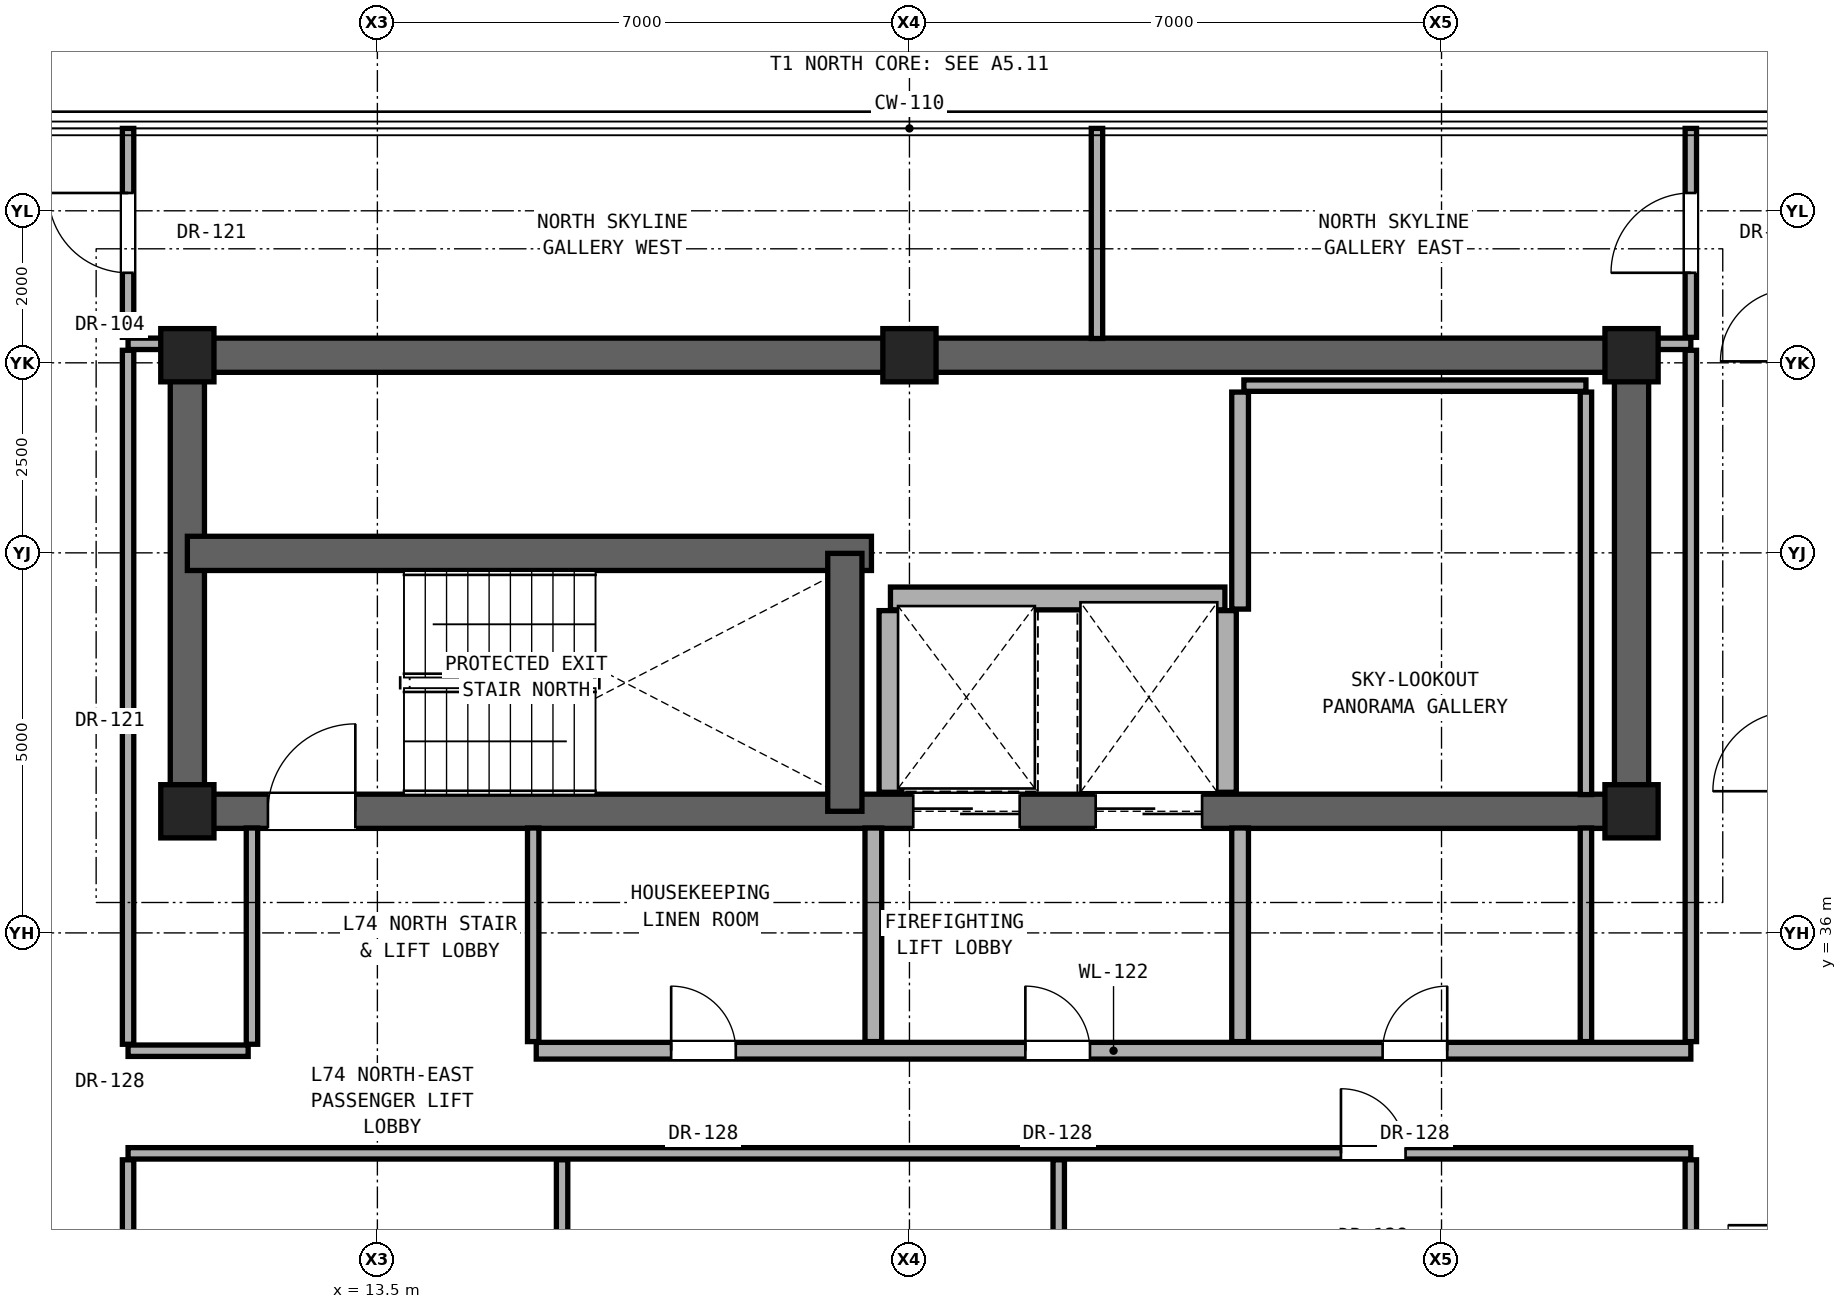
"""IFC4 building model, lengths in metres.
Left out: names, types, materials, properties, quantities, classifications, styles, units other than length and angle.
Written with IfcOpenShell. Run it as: python <this file> out.ifc"""

import sys

from ifc_helpers import new_model, si_unit, direction, frame, frame_2d, origin, origin_2d, place, context, subcontext, project, spatial, rectangle, extrude, element, fill, save


model = new_model("IFC4")
c1 = context("Model", 3, precision=1e-05, world=origin(), true_north=direction((0.0, 1.0)))
c2 = subcontext(c1, "Body", "Model", "MODEL_VIEW")
j1 = project(units=[si_unit("LENGTHUNIT", "METRE"), si_unit("PLANEANGLEUNIT", "RADIAN")], contexts=[c1])
p1 = place(None, origin())
s1 = spatial("IfcSite", under=j1, at=p1, CompositionType="ELEMENT")
p2 = place(p1, origin())
s2 = spatial("IfcBuilding", under=s1, at=p2, CompositionType="ELEMENT")
p3 = place(p2, frame((0.0, 0.0, 259.9)))
s3 = spatial("IfcBuildingStorey", under=s2, at=p3, CompositionType="ELEMENT", Elevation=259.9)
for number, where, z_axis, x_axis in (
    (1, (11.0, 37.6, 0.0), (0.0, 0.0, 1.0), (1.0, 0.0, 0.0)),
    (2, (30.0, 37.6, 0.0), (0.0, 0.0, 1.0), (1.0, 0.0, 0.0)),
    (3, (11.0, 43.6, 0.0), (0.0, 0.0, 1.0), (1.0, 0.0, 0.0)),
    (4, (20.5, 43.6, 0.0), (0.0, 0.0, 1.0), (1.0, 0.0, 0.0)),
    (5, (30.0, 43.6, 0.0), (0.0, 0.0, 1.0), (1.0, 0.0, 0.0)),
):
    element("IfcColumn", number, at=place(p3, frame(where, z_axis=z_axis, x_axis=x_axis)), inside=s3, PredefinedType="COLUMN", context=c2, shape_type="SweptSolid", body=[
        extrude(rectangle(XDim=0.7, YDim=0.7, at=origin_2d()), origin(), (0.0, 0.0, 1.0), 3.6),
    ])
p4 = place(p3, frame((11.0, 43.6, 0.0), z_axis=(0.0, 0.0, 1.0), x_axis=(1.0, 0.0, 0.0)))
e6 = element("IfcWall", 6, at=p4, inside=s3, PredefinedType="SHEAR", context=c2, shape_type="SweptSolid", body=[
    extrude(rectangle(XDim=19.0, YDim=0.45, at=frame_2d((9.5, 0.0))), origin(), (0.0, 0.0, 1.0), 2.95),
])
for number, where, z_axis, x_axis in (
    (7, (11.0, 37.6, 0.0), (0.0, 0.0, 1.0), (0.0, 1.0, 0.0)),
    (8, (30.0, 37.6, 0.0), (0.0, 0.0, 1.0), (0.0, 1.0, 0.0)),
):
    element("IfcWall", number, at=place(p3, frame(where, z_axis=z_axis, x_axis=x_axis)), inside=s3, PredefinedType="SHEAR", context=c2, shape_type="SweptSolid", body=[
        extrude(rectangle(XDim=6.0, YDim=0.45, at=frame_2d((3.0, 0.0))), origin(), (0.0, 0.0, 1.0), 2.95),
    ])
p5 = place(p3, frame((11.0, 37.6, 0.0), z_axis=(0.0, 0.0, 1.0), x_axis=(1.0, 0.0, 0.0)))
e9 = element("IfcWall", 9, at=p5, inside=s3, PredefinedType="SHEAR", context=c2, shape_type="SweptSolid", body=[
    extrude(rectangle(XDim=19.0, YDim=0.45, at=frame_2d((9.5, 0.0))), origin(), (0.0, 0.0, 1.0), 2.95),
])
p6 = place(p5, frame((1.06, 0.0, 0.0)))
e10 = element("IfcOpeningElement", 10, at=p6, cuts=e9, PredefinedType="OPENING", context=c2, shape_type="SweptSolid", body=[
    extrude(rectangle(XDim=1.15, YDim=2.2, at=frame_2d((0.575, 1.1))), frame((0.0, 0.235, 0.0), z_axis=(0.0, -1.0, 0.0), x_axis=(1.0, 0.0, 0.0)), (0.0, 0.0, 1.0), 0.47),
])
p7 = place(p5, frame((9.55, 0.0, 0.0)))
e11 = element("IfcOpeningElement", 11, at=p7, cuts=e9, PredefinedType="OPENING", context=c2, shape_type="SweptSolid", body=[
    extrude(rectangle(XDim=1.4, YDim=2.35, at=frame_2d((0.7, 1.175))), frame((0.0, 0.235, 0.0), z_axis=(0.0, -1.0, 0.0), x_axis=(1.0, 0.0, 0.0)), (0.0, 0.0, 1.0), 0.47),
])
p8 = place(p5, frame((11.95, 0.0, 0.0)))
e12 = element("IfcOpeningElement", 12, at=p8, cuts=e9, PredefinedType="OPENING", context=c2, shape_type="SweptSolid", body=[
    extrude(rectangle(XDim=1.4, YDim=2.35, at=frame_2d((0.7, 1.175))), frame((0.0, 0.235, 0.0), z_axis=(0.0, -1.0, 0.0), x_axis=(1.0, 0.0, 0.0)), (0.0, 0.0, 1.0), 0.47),
])
p9 = place(p3, frame((11.0, 40.993, 0.0), z_axis=(0.0, 0.0, 1.0), x_axis=(1.0, 0.0, 0.0)))
e13 = element("IfcWall", 13, at=p9, inside=s3, PredefinedType="SHEAR", context=c2, shape_type="SweptSolid", body=[
    extrude(rectangle(XDim=9.0, YDim=0.45, at=frame_2d((4.5, 0.0))), origin(), (0.0, 0.0, 1.0), 2.95),
])
p10 = place(p3, frame((19.65, 37.6, 0.0), z_axis=(0.0, 0.0, 1.0), x_axis=(0.0, 1.0, 0.0)))
e14 = element("IfcWall", 14, at=p10, inside=s3, PredefinedType="SHEAR", context=c2, shape_type="SweptSolid", body=[
    extrude(rectangle(XDim=3.393, YDim=0.45, at=frame_2d((1.696, 0.0))), origin(), (0.0, 0.0, 1.0), 2.95),
])
p11 = place(p3, frame((10.22, 33.1, 0.0), z_axis=(0.0, 0.0, 1.0), x_axis=(1.0, 0.0, 0.0)))
e15 = element("IfcWall", 15, at=p11, inside=s3, PredefinedType="PARTITIONING", context=c2, shape_type="SweptSolid", body=[
    extrude(rectangle(XDim=20.56, YDim=0.15, at=frame_2d((10.28, 0.0))), origin(), (0.0, 0.0, 1.0), 2.086),
])
p12 = place(p11, frame((15.957, 0.0, 0.0)))
e16 = element("IfcOpeningElement", 16, at=p12, cuts=e15, PredefinedType="OPENING", context=c2, shape_type="SweptSolid", body=[
    extrude(rectangle(XDim=0.85, YDim=2.01, at=frame_2d((0.425, 1.005))), frame((0.0, 0.085, 0.0), z_axis=(0.0, -1.0, 0.0), x_axis=(1.0, 0.0, 0.0)), (0.0, 0.0, 1.0), 0.17),
])
p13 = place(p3, frame((10.22, 34.45, 0.0), z_axis=(0.0, 0.0, 1.0), x_axis=(1.0, 0.0, 0.0)))
e17 = element("IfcWall", 17, at=p13, inside=s3, PredefinedType="PARTITIONING", context=c2, shape_type="SweptSolid", body=[
    extrude(rectangle(XDim=1.58, YDim=0.15, at=frame_2d((0.79, 0.0))), origin(), (0.0, 0.0, 1.0), 2.086),
])
p14 = place(p3, frame((15.59, 34.45, 0.0), z_axis=(0.0, 0.0, 1.0), x_axis=(1.0, 0.0, 0.0)))
e18 = element("IfcWall", 18, at=p14, inside=s3, PredefinedType="SOLIDWALL", context=c2, shape_type="SweptSolid", body=[
    extrude(rectangle(XDim=15.19, YDim=0.22, at=frame_2d((7.595, 0.0))), origin(), (0.0, 0.0, 1.0), 2.086),
])
p15 = place(p14, frame((6.435, 0.0, 0.0)))
e19 = element("IfcOpeningElement", 19, at=p15, cuts=e18, PredefinedType="OPENING", context=c2, shape_type="SweptSolid", body=[
    extrude(rectangle(XDim=0.85, YDim=2.01, at=frame_2d((0.425, 1.005))), frame((0.0, 0.12, 0.0), z_axis=(0.0, -1.0, 0.0), x_axis=(1.0, 0.0, 0.0)), (0.0, 0.0, 1.0), 0.24),
])
p16 = place(p14, frame((11.135, 0.0, 0.0)))
e20 = element("IfcOpeningElement", 20, at=p16, cuts=e18, PredefinedType="OPENING", context=c2, shape_type="SweptSolid", body=[
    extrude(rectangle(XDim=0.85, YDim=2.01, at=frame_2d((0.425, 1.005))), frame((0.0, 0.12, 0.0), z_axis=(0.0, -1.0, 0.0), x_axis=(1.0, 0.0, 0.0)), (0.0, 0.0, 1.0), 0.24),
])
p17 = place(p14, frame((1.775, 0.0, 0.0)))
e21 = element("IfcOpeningElement", 21, at=p17, cuts=e18, PredefinedType="OPENING", context=c2, shape_type="SweptSolid", body=[
    extrude(rectangle(XDim=0.85, YDim=2.01, at=frame_2d((0.425, 1.005))), frame((0.0, 0.12, 0.0), z_axis=(0.0, -1.0, 0.0), x_axis=(1.0, 0.0, 0.0)), (0.0, 0.0, 1.0), 0.24),
])
p18 = place(p3, frame((20.25, 40.4, 0.0), z_axis=(0.0, 0.0, 1.0), x_axis=(1.0, 0.0, 0.0)))
e22 = element("IfcWall", 22, at=p18, inside=s3, PredefinedType="SOLIDWALL", context=c2, shape_type="SweptSolid", body=[
    extrude(rectangle(XDim=4.4, YDim=0.3, at=frame_2d((2.2, 0.0))), origin(), (0.0, 0.0, 1.0), 2.95),
])
p19 = place(p3, frame((24.9, 43.2, 0.0), z_axis=(0.0, 0.0, 1.0), x_axis=(1.0, 0.0, 0.0)))
e23 = element("IfcWall", 23, at=p19, inside=s3, PredefinedType="PARTITIONING", context=c2, shape_type="SweptSolid", body=[
    extrude(rectangle(XDim=4.5, YDim=0.15, at=frame_2d((2.25, 0.0))), origin(), (0.0, 0.0, 1.0), 2.95),
])
for number, where, z_axis, x_axis in (
    (24, (10.22, 43.75, 0.0), (0.0, 0.0, 1.0), (1.0, 0.0, 0.0)),
    (25, (30.22, 43.75, 0.0), (0.0, 0.0, 1.0), (1.0, 0.0, 0.0)),
):
    element("IfcWall", number, at=place(p3, frame(where, z_axis=z_axis, x_axis=x_axis)), inside=s3, PredefinedType="PARTITIONING", context=c2, shape_type="SweptSolid", body=[
        extrude(rectangle(XDim=0.56, YDim=0.15, at=frame_2d((0.28, 0.0))), origin(), (0.0, 0.0, 1.0), 2.95),
    ])
p20 = place(p3, frame((10.22, 22.935, 0.0), z_axis=(0.0, 0.0, 1.0), x_axis=(0.0, 1.0, 0.0)))
e26 = element("IfcWall", 26, at=p20, inside=s3, PredefinedType="PARTITIONING", context=c2, shape_type="SweptSolid", body=[
    extrude(rectangle(XDim=10.08, YDim=0.15, at=frame_2d((5.04, 0.0))), origin(), (0.0, 0.0, 1.0), 2.246),
])
p21 = place(p20, frame((4.565, 0.0, 0.0)))
e27 = element("IfcOpeningElement", 27, at=p21, cuts=e26, PredefinedType="OPENING", context=c2, shape_type="SweptSolid", body=[
    extrude(rectangle(XDim=0.95, YDim=2.15, at=frame_2d((0.475, 1.075))), frame((0.0, 0.085, 0.0), z_axis=(0.0, -1.0, 0.0), x_axis=(1.0, 0.0, 0.0)), (0.0, 0.0, 1.0), 0.17),
])
p22 = place(p3, frame((10.22, 34.535, 0.0), z_axis=(0.0, 0.0, 1.0), x_axis=(0.0, 1.0, 0.0)))
e28 = element("IfcWall", 28, at=p22, inside=s3, PredefinedType="PARTITIONING", context=c2, shape_type="SweptSolid", body=[
    extrude(rectangle(XDim=9.13, YDim=0.15, at=frame_2d((4.565, 0.0))), origin(), (0.0, 0.0, 1.0), 2.393),
])
p23 = place(p3, frame((10.22, 43.835, 0.0), z_axis=(0.0, 0.0, 1.0), x_axis=(0.0, 1.0, 0.0)))
e29 = element("IfcWall", 29, at=p23, inside=s3, PredefinedType="PARTITIONING", context=c2, shape_type="SweptSolid", body=[
    extrude(rectangle(XDim=2.749, YDim=0.15, at=frame_2d((1.375, 0.0))), origin(), (0.0, 0.0, 1.0), 2.95),
])
p24 = place(p23, frame((0.85, 0.0, 0.0)))
e30 = element("IfcOpeningElement", 30, at=p24, cuts=e29, PredefinedType="OPENING", context=c2, shape_type="SweptSolid", body=[
    extrude(rectangle(XDim=1.05, YDim=2.2, at=frame_2d((0.525, 1.1))), frame((0.0, 0.085, 0.0), z_axis=(0.0, -1.0, 0.0), x_axis=(1.0, 0.0, 0.0)), (0.0, 0.0, 1.0), 0.17),
])
p25 = place(p3, frame((11.85, 34.535, 0.0), z_axis=(0.0, 0.0, 1.0), x_axis=(0.0, 1.0, 0.0)))
e31 = element("IfcWall", 31, at=p25, inside=s3, PredefinedType="PARTITIONING", context=c2, shape_type="SweptSolid", body=[
    extrude(rectangle(XDim=2.845, YDim=0.15, at=frame_2d((1.422, 0.0))), origin(), (0.0, 0.0, 1.0), 2.95),
])
p26 = place(p3, frame((15.55, 34.57, 0.0), z_axis=(0.0, 0.0, 1.0), x_axis=(0.0, 1.0, 0.0)))
e32 = element("IfcWall", 32, at=p26, inside=s3, PredefinedType="PARTITIONING", context=c2, shape_type="SweptSolid", body=[
    extrude(rectangle(XDim=2.81, YDim=0.15, at=frame_2d((1.405, 0.0))), origin(), (0.0, 0.0, 1.0), 2.95),
])
p27 = place(p3, frame((15.93, 22.935, 0.0), z_axis=(0.0, 0.0, 1.0), x_axis=(0.0, 1.0, 0.0)))
e33 = element("IfcWall", 33, at=p27, inside=s3, PredefinedType="PARTITIONING", context=c2, shape_type="SweptSolid", body=[
    extrude(rectangle(XDim=10.08, YDim=0.15, at=frame_2d((5.04, 0.0))), origin(), (0.0, 0.0, 1.0), 2.086),
])
p28 = place(p3, frame((20.025, 34.57, 0.0), z_axis=(0.0, 0.0, 1.0), x_axis=(0.0, 1.0, 0.0)))
e34 = element("IfcWall", 34, at=p28, inside=s3, PredefinedType="SOLIDWALL", context=c2, shape_type="SweptSolid", body=[
    extrude(rectangle(XDim=2.81, YDim=0.22, at=frame_2d((1.405, 0.0))), origin(), (0.0, 0.0, 1.0), 2.95),
])
p29 = place(p3, frame((20.25, 37.85, 0.0), z_axis=(0.0, 0.0, 1.0), x_axis=(0.0, 1.0, 0.0)))
e35 = element("IfcWall", 35, at=p29, inside=s3, PredefinedType="SOLIDWALL", context=c2, shape_type="SweptSolid", body=[
    extrude(rectangle(XDim=2.39, YDim=0.3, at=frame_2d((1.195, 0.0))), origin(), (0.0, 0.0, 1.0), 2.95),
])
p30 = place(p3, frame((22.464, 19.985, 0.0), z_axis=(0.0, 0.0, 1.0), x_axis=(0.0, 1.0, 0.0)))
e36 = element("IfcWall", 36, at=p30, inside=s3, PredefinedType="PARTITIONING", context=c2, shape_type="SweptSolid", body=[
    extrude(rectangle(XDim=13.03, YDim=0.15, at=frame_2d((6.515, 0.0))), origin(), (0.0, 0.0, 1.0), 2.086),
])
p31 = place(p3, frame((22.967, 43.82, 0.0), z_axis=(0.0, 0.0, 1.0), x_axis=(0.0, 1.0, 0.0)))
e37 = element("IfcWall", 37, at=p31, inside=s3, PredefinedType="PARTITIONING", context=c2, shape_type="SweptSolid", body=[
    extrude(rectangle(XDim=2.764, YDim=0.15, at=frame_2d((1.382, 0.0))), origin(), (0.0, 0.0, 1.0), 2.95),
])
p32 = place(p3, frame((24.65, 37.85, 0.0), z_axis=(0.0, 0.0, 1.0), x_axis=(0.0, 1.0, 0.0)))
e38 = element("IfcWall", 38, at=p32, inside=s3, PredefinedType="SOLIDWALL", context=c2, shape_type="SweptSolid", body=[
    extrude(rectangle(XDim=2.39, YDim=0.3, at=frame_2d((1.195, 0.0))), origin(), (0.0, 0.0, 1.0), 2.95),
])
p33 = place(p3, frame((24.85, 34.57, 0.0), z_axis=(0.0, 0.0, 1.0), x_axis=(0.0, 1.0, 0.0)))
e39 = element("IfcWall", 39, at=p33, inside=s3, PredefinedType="SOLIDWALL", context=c2, shape_type="SweptSolid", body=[
    extrude(rectangle(XDim=2.81, YDim=0.22, at=frame_2d((1.405, 0.0))), origin(), (0.0, 0.0, 1.0), 2.95),
])
p34 = place(p3, frame((24.85, 40.26, 0.0), z_axis=(0.0, 0.0, 1.0), x_axis=(0.0, 1.0, 0.0)))
e40 = element("IfcWall", 40, at=p34, inside=s3, PredefinedType="SOLIDWALL", context=c2, shape_type="SweptSolid", body=[
    extrude(rectangle(XDim=2.855, YDim=0.22, at=frame_2d((1.427, 0.0))), origin(), (0.0, 0.0, 1.0), 2.95),
])
p35 = place(p3, frame((29.4, 34.57, 0.0), z_axis=(0.0, 0.0, 1.0), x_axis=(0.0, 1.0, 0.0)))
e41 = element("IfcWall", 41, at=p35, inside=s3, PredefinedType="PARTITIONING", context=c2, shape_type="SweptSolid", body=[
    extrude(rectangle(XDim=2.81, YDim=0.15, at=frame_2d((1.405, 0.0))), origin(), (0.0, 0.0, 1.0), 2.95),
])
p36 = place(p3, frame((29.4, 37.82, 0.0), z_axis=(0.0, 0.0, 1.0), x_axis=(0.0, 1.0, 0.0)))
e42 = element("IfcWall", 42, at=p36, inside=s3, PredefinedType="PARTITIONING", context=c2, shape_type="SweptSolid", body=[
    extrude(rectangle(XDim=5.295, YDim=0.15, at=frame_2d((2.647, 0.0))), origin(), (0.0, 0.0, 1.0), 2.95),
])
p37 = place(p3, frame((30.78, 19.985, 0.0), z_axis=(0.0, 0.0, 1.0), x_axis=(0.0, 1.0, 0.0)))
e43 = element("IfcWall", 43, at=p37, inside=s3, PredefinedType="PARTITIONING", context=c2, shape_type="SweptSolid", body=[
    extrude(rectangle(XDim=13.03, YDim=0.15, at=frame_2d((6.515, 0.0))), origin(), (0.0, 0.0, 1.0), 2.246),
])
p38 = place(p3, frame((30.78, 34.57, 0.0), z_axis=(0.0, 0.0, 1.0), x_axis=(0.0, 1.0, 0.0)))
e44 = element("IfcWall", 44, at=p38, inside=s3, PredefinedType="PARTITIONING", context=c2, shape_type="SweptSolid", body=[
    extrude(rectangle(XDim=9.095, YDim=0.15, at=frame_2d((4.547, 0.0))), origin(), (0.0, 0.0, 1.0), 2.393),
])
p39 = place(p3, frame((30.78, 43.835, 0.0), z_axis=(0.0, 0.0, 1.0), x_axis=(0.0, 1.0, 0.0)))
e45 = element("IfcWall", 45, at=p39, inside=s3, PredefinedType="PARTITIONING", context=c2, shape_type="SweptSolid", body=[
    extrude(rectangle(XDim=2.749, YDim=0.15, at=frame_2d((1.375, 0.0))), origin(), (0.0, 0.0, 1.0), 2.95),
])
p40 = place(p39, frame((0.85, 0.0, 0.0)))
e46 = element("IfcOpeningElement", 46, at=p40, cuts=e45, PredefinedType="OPENING", context=c2, shape_type="SweptSolid", body=[
    extrude(rectangle(XDim=1.05, YDim=2.2, at=frame_2d((0.525, 1.1))), frame((0.0, 0.085, 0.0), z_axis=(0.0, -1.0, 0.0), x_axis=(1.0, 0.0, 0.0)), (0.0, 0.0, 1.0), 0.17),
])
p41 = place(p6, origin())
e47 = element("IfcDoor", 47, at=p41, inside=s3, OperationType="SINGLE_SWING_RIGHT", PredefinedType="DOOR", context=c2, shape_type="SweptSolid", body=[
    extrude(rectangle(XDim=1.15, YDim=2.2, at=frame_2d((0.575, 1.1))), frame((0.0, 0.025, 0.0), z_axis=(0.0, -1.0, 0.0), x_axis=(1.0, 0.0, 0.0)), (0.0, 0.0, 1.0), 0.05),
])
fill(e10, e47)
p42 = place(p15, origin())
e48 = element("IfcDoor", 48, at=p42, inside=s3, OperationType="SINGLE_SWING_LEFT", PredefinedType="DOOR", context=c2, shape_type="SweptSolid", body=[
    extrude(rectangle(XDim=0.85, YDim=2.01, at=frame_2d((0.425, 1.005))), frame((0.0, 0.025, 0.0), z_axis=(0.0, -1.0, 0.0), x_axis=(1.0, 0.0, 0.0)), (0.0, 0.0, 1.0), 0.05),
])
fill(e19, e48)
p43 = place(p16, origin())
e49 = element("IfcDoor", 49, at=p43, inside=s3, OperationType="SINGLE_SWING_RIGHT", PredefinedType="DOOR", context=c2, shape_type="SweptSolid", body=[
    extrude(rectangle(XDim=0.85, YDim=2.01, at=frame_2d((0.425, 1.005))), frame((0.0, 0.025, 0.0), z_axis=(0.0, -1.0, 0.0), x_axis=(1.0, 0.0, 0.0)), (0.0, 0.0, 1.0), 0.05),
])
fill(e20, e49)
p44 = place(p17, origin())
e50 = element("IfcDoor", 50, at=p44, inside=s3, OperationType="SINGLE_SWING_LEFT", PredefinedType="DOOR", context=c2, shape_type="SweptSolid", body=[
    extrude(rectangle(XDim=0.85, YDim=2.01, at=frame_2d((0.425, 1.005))), frame((0.0, 0.025, 0.0), z_axis=(0.0, -1.0, 0.0), x_axis=(1.0, 0.0, 0.0)), (0.0, 0.0, 1.0), 0.05),
])
fill(e21, e50)
p45 = place(p12, origin())
e51 = element("IfcDoor", 51, at=p45, inside=s3, OperationType="SINGLE_SWING_LEFT", PredefinedType="DOOR", context=c2, shape_type="SweptSolid", body=[
    extrude(rectangle(XDim=0.85, YDim=2.01, at=frame_2d((0.425, 1.005))), frame((0.0, 0.025, 0.0), z_axis=(0.0, -1.0, 0.0), x_axis=(1.0, 0.0, 0.0)), (0.0, 0.0, 1.0), 0.05),
])
fill(e16, e51)
p46 = place(p24, origin())
e52 = element("IfcDoor", 52, at=p46, inside=s3, OperationType="SINGLE_SWING_RIGHT", PredefinedType="DOOR", context=c2, shape_type="SweptSolid", body=[
    extrude(rectangle(XDim=1.05, YDim=2.2, at=frame_2d((0.525, 1.1))), frame((0.0, 0.025, 0.0), z_axis=(0.0, -1.0, 0.0), x_axis=(1.0, 0.0, 0.0)), (0.0, 0.0, 1.0), 0.05),
])
fill(e30, e52)
p47 = place(p40, origin())
e53 = element("IfcDoor", 53, at=p47, inside=s3, OperationType="SINGLE_SWING_LEFT", PredefinedType="DOOR", context=c2, shape_type="SweptSolid", body=[
    extrude(rectangle(XDim=1.05, YDim=2.2, at=frame_2d((0.525, 1.1))), frame((0.0, 0.025, 0.0), z_axis=(0.0, -1.0, 0.0), x_axis=(1.0, 0.0, 0.0)), (0.0, 0.0, 1.0), 0.05),
])
fill(e46, e53)
p48 = place(p7, origin())
e54 = element("IfcDoor", 54, at=p48, inside=s3, OperationType="DOUBLE_DOOR_SLIDING", PredefinedType="DOOR", context=c2, shape_type="SweptSolid", body=[
    extrude(rectangle(XDim=1.4, YDim=2.35, at=frame_2d((0.7, 1.175))), frame((0.0, 0.025, 0.0), z_axis=(0.0, -1.0, 0.0), x_axis=(1.0, 0.0, 0.0)), (0.0, 0.0, 1.0), 0.05),
])
fill(e11, e54)
p49 = place(p8, origin())
e55 = element("IfcDoor", 55, at=p49, inside=s3, OperationType="DOUBLE_DOOR_SLIDING", PredefinedType="DOOR", context=c2, shape_type="SweptSolid", body=[
    extrude(rectangle(XDim=1.4, YDim=2.35, at=frame_2d((0.7, 1.175))), frame((0.0, 0.025, 0.0), z_axis=(0.0, -1.0, 0.0), x_axis=(1.0, 0.0, 0.0)), (0.0, 0.0, 1.0), 0.05),
])
fill(e12, e55)
save(model, sys.argv[1])
